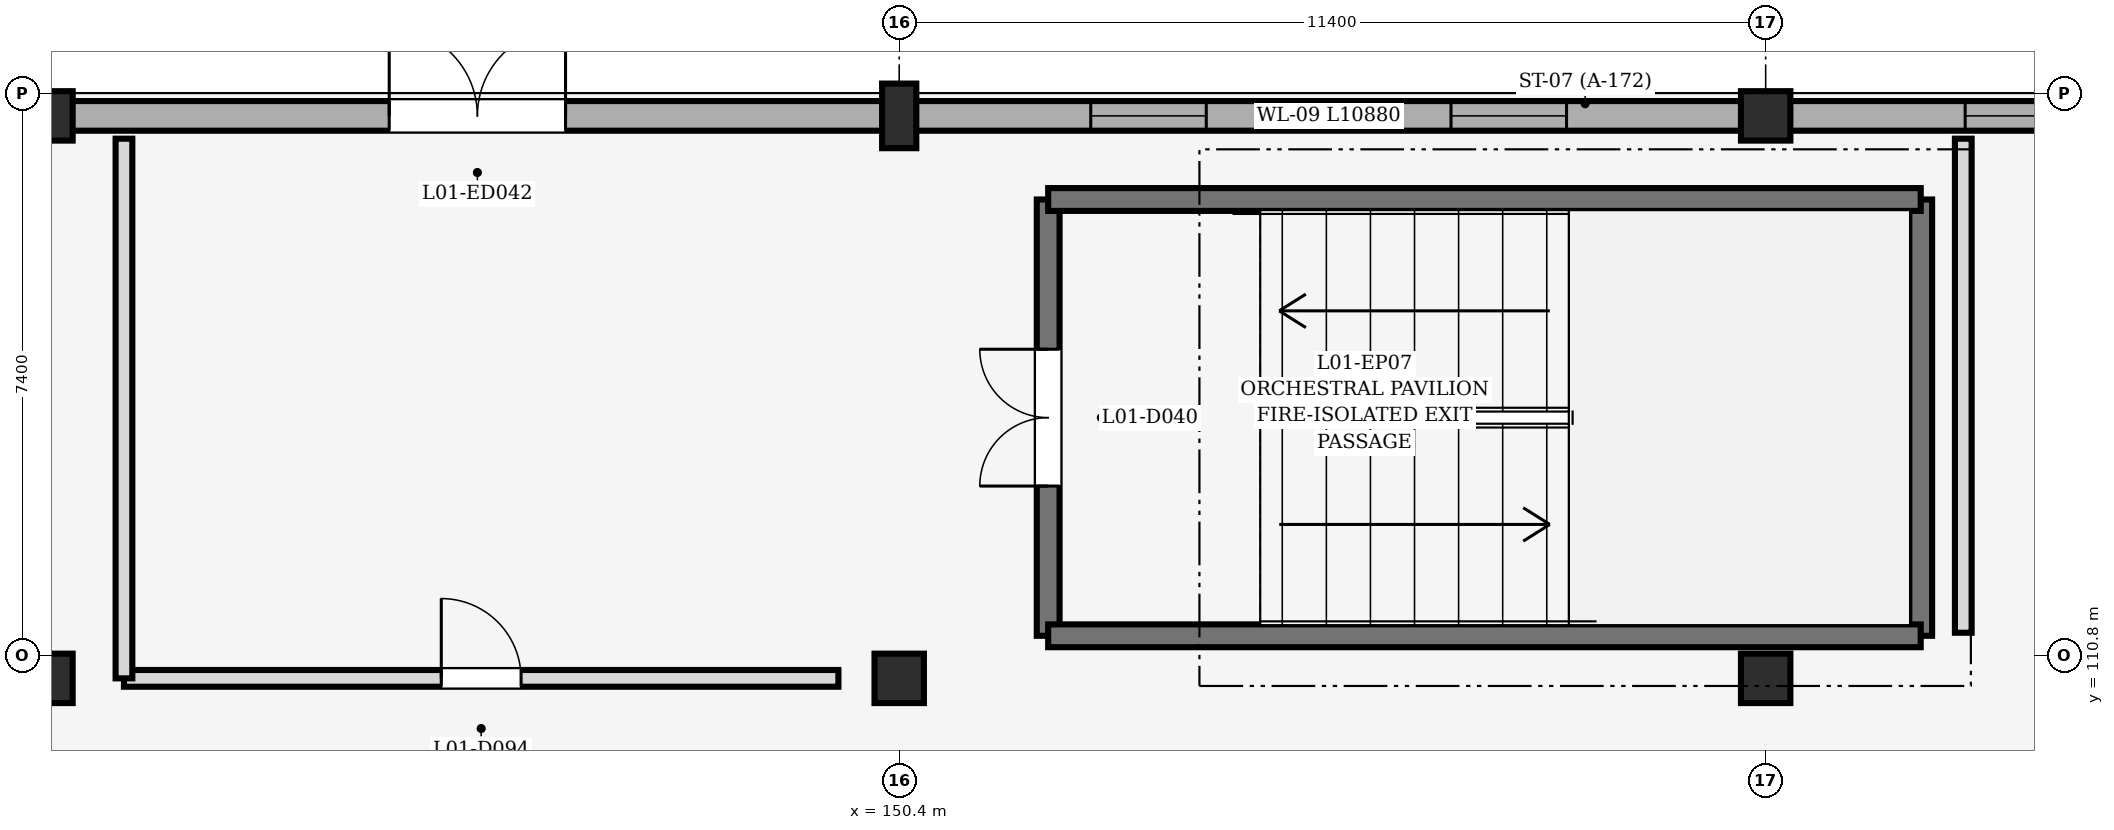
"""IFC4 building model, lengths in metres.
Left out: names, types, materials, properties, quantities, classifications, styles, units other than length and angle.
Written with IfcOpenShell. Run it as: python <this file> out.ifc"""

import sys

from ifc_helpers import new_model, si_unit, direction, frame, frame_2d, origin, origin_2d, place, context, subcontext, project, spatial, rectangle, extrude, element, fill, save


model = new_model("IFC4")
c1 = context("Model", 3, precision=1e-05, world=origin(), true_north=direction((0.0, 1.0)))
c2 = subcontext(c1, "Body", "Model", "MODEL_VIEW")
j1 = project(units=[si_unit("LENGTHUNIT", "METRE"), si_unit("PLANEANGLEUNIT", "RADIAN")], contexts=[c1])
p1 = place(None, origin())
s1 = spatial("IfcSite", under=j1, at=p1, CompositionType="ELEMENT")
p2 = place(p1, origin())
s2 = spatial("IfcBuilding", under=s1, at=p2, CompositionType="ELEMENT")
p3 = place(p2, origin())
s3 = spatial("IfcBuildingStorey", under=s2, at=p3, CompositionType="ELEMENT", Elevation=0.0)
for number, where, z_axis, x_axis in (
    (1, (139.2, 110.5, 0.0), (0.0, 0.0, 1.0), (1.0, 0.0, 0.0)),
    (2, (139.2, 117.9, 0.0), (0.0, 0.0, 1.0), (1.0, 0.0, 0.0)),
    (3, (150.4, 110.5, 0.0), (0.0, 0.0, 1.0), (1.0, 0.0, 0.0)),
):
    element("IfcColumn", number, at=place(p3, frame(where, z_axis=z_axis, x_axis=x_axis)), inside=s3, PredefinedType="COLUMN", context=c2, shape_type="SweptSolid", body=[
        extrude(rectangle(XDim=0.65, YDim=0.65, at=origin_2d()), origin(), (0.0, 0.0, 1.0), 5.4),
    ])
p4 = place(p3, frame((150.4, 117.9, 0.0), z_axis=(0.0, 0.0, 1.0), x_axis=(1.0, 0.0, 0.0)))
e4 = element("IfcColumn", 4, at=p4, inside=s3, PredefinedType="PILASTER", context=c2, shape_type="SweptSolid", body=[
    extrude(rectangle(XDim=0.45, YDim=0.85, at=origin_2d()), origin(), (0.0, 0.0, 1.0), 5.4),
])
for number, where, z_axis, x_axis in (
    (5, (161.8, 110.5, 0.0), (0.0, 0.0, 1.0), (1.0, 0.0, 0.0)),
    (6, (161.8, 117.9, 0.0), (0.0, 0.0, 1.0), (1.0, 0.0, 0.0)),
):
    element("IfcColumn", number, at=place(p3, frame(where, z_axis=z_axis, x_axis=x_axis)), inside=s3, PredefinedType="COLUMN", context=c2, shape_type="SweptSolid", body=[
        extrude(rectangle(XDim=0.65, YDim=0.65, at=origin_2d()), origin(), (0.0, 0.0, 1.0), 5.4),
    ])
p5 = place(p3, frame((139.51, 117.9, 0.0), z_axis=(0.0, 0.0, 1.0), x_axis=(1.0, 0.0, 0.0)))
e7 = element("IfcWall", 7, at=p5, inside=s3, PredefinedType="STANDARD", context=c2, shape_type="SweptSolid", body=[
    extrude(rectangle(XDim=10.68, YDim=0.39, at=frame_2d((5.34, 0.0))), origin(), (0.0, 0.0, 1.0), 4.407),
])
p6 = place(p5, frame((4.18, 0.0, 0.0)))
e8 = element("IfcOpeningElement", 8, at=p6, cuts=e7, PredefinedType="OPENING", context=c2, shape_type="SweptSolid", body=[
    extrude(rectangle(XDim=2.32, YDim=2.4, at=frame_2d((1.16, 1.2))), frame((0.0, 0.207, 0.0), z_axis=(0.0, -1.0, 0.0), x_axis=(1.0, 0.0, 0.0)), (0.0, 0.0, 1.0), 0.414),
])
p7 = place(p3, frame((150.61, 117.9, 0.0), z_axis=(0.0, 0.0, 1.0), x_axis=(1.0, 0.0, 0.0)))
e9 = element("IfcWall", 9, at=p7, inside=s3, PredefinedType="STANDARD", context=c2, shape_type="SweptSolid", body=[
    extrude(rectangle(XDim=10.88, YDim=0.39, at=frame_2d((5.44, 0.0))), origin(), (0.0, 0.0, 1.0), 4.407),
])
p8 = place(p7, frame((2.31, 0.0, 0.85)))
e10 = element("IfcOpeningElement", 10, at=p8, cuts=e9, PredefinedType="OPENING", context=c2, shape_type="SweptSolid", body=[
    extrude(rectangle(XDim=1.52, YDim=1.75, at=frame_2d((0.76, 0.875))), frame((0.0, 0.207, 0.0), z_axis=(0.0, -1.0, 0.0), x_axis=(1.0, 0.0, 0.0)), (0.0, 0.0, 1.0), 0.414),
])
p9 = place(p7, frame((7.05, 0.0, 0.85)))
e11 = element("IfcOpeningElement", 11, at=p9, cuts=e9, PredefinedType="OPENING", context=c2, shape_type="SweptSolid", body=[
    extrude(rectangle(XDim=1.52, YDim=1.75, at=frame_2d((0.76, 0.875))), frame((0.0, 0.207, 0.0), z_axis=(0.0, -1.0, 0.0), x_axis=(1.0, 0.0, 0.0)), (0.0, 0.0, 1.0), 0.414),
])
p10 = place(p3, frame((162.11, 117.9, 0.0), z_axis=(0.0, 0.0, 1.0), x_axis=(1.0, 0.0, 0.0)))
e12 = element("IfcWall", 12, at=p10, inside=s3, PredefinedType="STANDARD", context=c2, shape_type="SweptSolid", body=[
    extrude(rectangle(XDim=10.58, YDim=0.39, at=frame_2d((5.29, 0.0))), origin(), (0.0, 0.0, 1.0), 4.407),
])
p11 = place(p10, frame((2.315, 0.0, 0.85)))
e13 = element("IfcOpeningElement", 13, at=p11, cuts=e12, PredefinedType="OPENING", context=c2, shape_type="SweptSolid", body=[
    extrude(rectangle(XDim=1.36, YDim=1.5, at=frame_2d((0.68, 0.75))), frame((0.0, 0.207, 0.0), z_axis=(0.0, -1.0, 0.0), x_axis=(1.0, 0.0, 0.0)), (0.0, 0.0, 1.0), 0.414),
])
p12 = place(p10, frame((6.905, 0.0, 0.85)))
e14 = element("IfcOpeningElement", 14, at=p12, cuts=e12, PredefinedType="OPENING", context=c2, shape_type="SweptSolid", body=[
    extrude(rectangle(XDim=1.36, YDim=1.5, at=frame_2d((0.68, 0.75))), frame((0.0, 0.207, 0.0), z_axis=(0.0, -1.0, 0.0), x_axis=(1.0, 0.0, 0.0)), (0.0, 0.0, 1.0), 0.414),
])
p13 = place(p3, frame((152.36, 111.06, 0.0), z_axis=(0.0, 0.0, 1.0), x_axis=(0.0, 1.0, 0.0)))
e15 = element("IfcWall", 15, at=p13, inside=s3, PredefinedType="SHEAR", context=c2, shape_type="SweptSolid", body=[
    extrude(rectangle(XDim=5.74, YDim=0.3, at=frame_2d((2.87, 0.0))), origin(), (0.0, 0.0, 1.0), 5.12),
])
p14 = place(p13, frame((1.97, 0.0, 0.0)))
e16 = element("IfcOpeningElement", 16, at=p14, cuts=e15, PredefinedType="OPENING", context=c2, shape_type="SweptSolid", body=[
    extrude(rectangle(XDim=1.8, YDim=2.2, at=frame_2d((0.9, 1.1))), frame((0.0, 0.162, 0.0), z_axis=(0.0, -1.0, 0.0), x_axis=(1.0, 0.0, 0.0)), (0.0, 0.0, 1.0), 0.324),
])
p15 = place(p3, frame((163.84, 116.8, 0.0), z_axis=(0.0, 0.0, 1.0), x_axis=(0.0, -1.0, 0.0)))
e17 = element("IfcWall", 17, at=p15, inside=s3, PredefinedType="SHEAR", context=c2, shape_type="SweptSolid", body=[
    extrude(rectangle(XDim=5.74, YDim=0.3, at=frame_2d((2.87, 0.0))), origin(), (0.0, 0.0, 1.0), 5.12),
])
for number, where, z_axis, x_axis in (
    (18, (163.84, 111.06, 0.0), (0.0, 0.0, 1.0), (-1.0, 0.0, 0.0)),
    (19, (152.36, 116.8, 0.0), (0.0, 0.0, 1.0), (1.0, 0.0, 0.0)),
):
    element("IfcWall", number, at=place(p3, frame(where, z_axis=z_axis, x_axis=x_axis)), inside=s3, PredefinedType="SHEAR", context=c2, shape_type="SweptSolid", body=[
        extrude(rectangle(XDim=11.48, YDim=0.3, at=frame_2d((5.74, 0.0))), origin(), (0.0, 0.0, 1.0), 5.12),
    ])
p16 = place(p3, frame((140.2, 110.5, 0.0), z_axis=(0.0, 0.0, 1.0), x_axis=(1.0, 0.0, 0.0)))
e20 = element("IfcWall", 20, at=p16, inside=s3, PredefinedType="SOLIDWALL", context=c2, shape_type="SweptSolid", body=[
    extrude(rectangle(XDim=9.4, YDim=0.22, at=frame_2d((4.7, 0.0))), origin(), (0.0, 0.0, 1.0), 4.407),
])
p17 = place(p16, frame((4.175, 0.0, 0.0)))
e21 = element("IfcOpeningElement", 21, at=p17, cuts=e20, PredefinedType="OPENING", context=c2, shape_type="SweptSolid", body=[
    extrude(rectangle(XDim=1.05, YDim=2.15, at=frame_2d((0.525, 1.075))), frame((0.0, 0.122, 0.0), z_axis=(0.0, -1.0, 0.0), x_axis=(1.0, 0.0, 0.0)), (0.0, 0.0, 1.0), 0.244),
])
p18 = place(p3, frame((140.2, 117.6, 0.0), z_axis=(0.0, 0.0, 1.0), x_axis=(0.0, -1.0, 0.0)))
e22 = element("IfcWall", 22, at=p18, inside=s3, PredefinedType="SOLIDWALL", context=c2, shape_type="SweptSolid", body=[
    extrude(rectangle(XDim=7.1, YDim=0.22, at=frame_2d((3.55, 0.0))), origin(), (0.0, 0.0, 1.0), 5.105),
])
p19 = place(p3, frame((164.4, 111.1, 0.0), z_axis=(0.0, 0.0, 1.0), x_axis=(0.0, 1.0, 0.0)))
e23 = element("IfcWall", 23, at=p19, inside=s3, PredefinedType="SOLIDWALL", context=c2, shape_type="SweptSolid", body=[
    extrude(rectangle(XDim=6.5, YDim=0.22, at=frame_2d((3.25, 0.0))), origin(), (0.0, 0.0, 1.0), 5.105),
])
p20 = place(p6, origin())
e24 = element("IfcDoor", 24, at=p20, inside=s3, OperationType="DOUBLE_DOOR_SINGLE_SWING", PredefinedType="DOOR", context=c2, shape_type="SweptSolid", body=[
    extrude(rectangle(XDim=2.32, YDim=2.4, at=frame_2d((1.16, 1.2))), frame((0.0, 0.025, 0.0), z_axis=(0.0, -1.0, 0.0), x_axis=(1.0, 0.0, 0.0)), (0.0, 0.0, 1.0), 0.05),
])
fill(e8, e24)
p21 = place(p8, origin())
e25 = element("IfcWindow", 25, at=p21, inside=s3, PartitioningType="DOUBLE_PANEL_VERTICAL", PredefinedType="WINDOW", context=c2, shape_type="SweptSolid", body=[
    extrude(rectangle(XDim=1.52, YDim=1.75, at=frame_2d((0.76, 0.875))), frame((0.0, 0.03, 0.0), z_axis=(0.0, -1.0, 0.0), x_axis=(1.0, 0.0, 0.0)), (0.0, 0.0, 1.0), 0.06),
])
fill(e10, e25)
p22 = place(p9, origin())
e26 = element("IfcWindow", 26, at=p22, inside=s3, PartitioningType="DOUBLE_PANEL_VERTICAL", PredefinedType="WINDOW", context=c2, shape_type="SweptSolid", body=[
    extrude(rectangle(XDim=1.52, YDim=1.75, at=frame_2d((0.76, 0.875))), frame((0.0, 0.03, 0.0), z_axis=(0.0, -1.0, 0.0), x_axis=(1.0, 0.0, 0.0)), (0.0, 0.0, 1.0), 0.06),
])
fill(e11, e26)
p23 = place(p11, origin())
e27 = element("IfcWindow", 27, at=p23, inside=s3, PartitioningType="DOUBLE_PANEL_VERTICAL", PredefinedType="WINDOW", context=c2, shape_type="SweptSolid", body=[
    extrude(rectangle(XDim=1.36, YDim=1.5, at=frame_2d((0.68, 0.75))), frame((0.0, 0.03, 0.0), z_axis=(0.0, -1.0, 0.0), x_axis=(1.0, 0.0, 0.0)), (0.0, 0.0, 1.0), 0.06),
])
fill(e13, e27)
p24 = place(p14, origin())
e28 = element("IfcDoor", 28, at=p24, inside=s3, OperationType="DOUBLE_DOOR_SINGLE_SWING", PredefinedType="DOOR", context=c2, shape_type="SweptSolid", body=[
    extrude(rectangle(XDim=1.8, YDim=2.2, at=frame_2d((0.9, 1.1))), frame((0.0, 0.025, 0.0), z_axis=(0.0, -1.0, 0.0), x_axis=(1.0, 0.0, 0.0)), (0.0, 0.0, 1.0), 0.05),
])
fill(e16, e28)
p25 = place(p17, origin())
e29 = element("IfcDoor", 29, at=p25, inside=s3, OperationType="SINGLE_SWING_LEFT", PredefinedType="DOOR", context=c2, shape_type="SweptSolid", body=[
    extrude(rectangle(XDim=1.05, YDim=2.15, at=frame_2d((0.525, 1.075))), frame((0.0, 0.025, 0.0), z_axis=(0.0, -1.0, 0.0), x_axis=(1.0, 0.0, 0.0)), (0.0, 0.0, 1.0), 0.05),
])
fill(e21, e29)
save(model, sys.argv[1])
